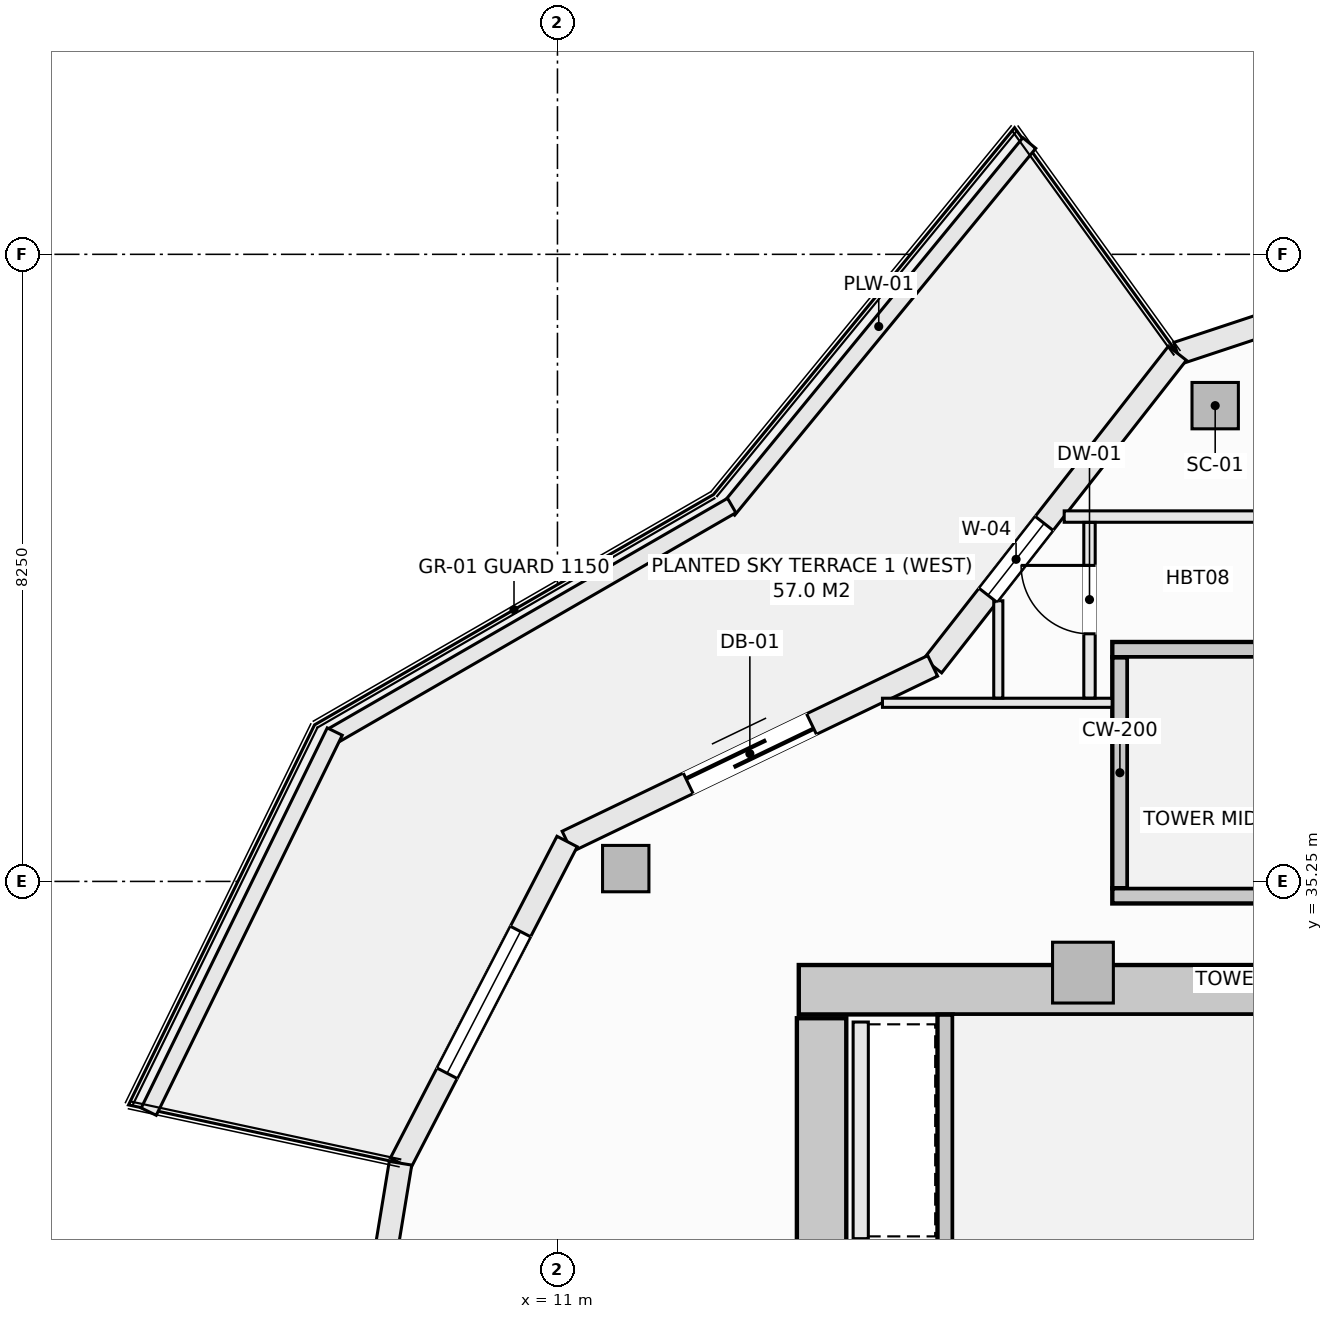
"""IFC4 building model, lengths in metres.
Left out: names, types, materials, properties, quantities, classifications, styles, units other than length and angle.
Written with IfcOpenShell. Run it as: python <this file> out.ifc"""

import sys

from ifc_helpers import new_model, si_unit, direction, frame, frame_2d, origin, origin_2d, place, context, subcontext, project, spatial, rectangle, hollow_rectangle, extrude, element, fill, save


model = new_model("IFC4")
c1 = context("Model", 3, precision=1e-05, world=origin(), true_north=direction((0.0, 1.0)))
c2 = subcontext(c1, "Body", "Model", "MODEL_VIEW")
j1 = project(units=[si_unit("LENGTHUNIT", "METRE"), si_unit("PLANEANGLEUNIT", "RADIAN")], contexts=[c1])
p1 = place(None, origin())
s1 = spatial("IfcSite", under=j1, at=p1, CompositionType="ELEMENT")
p2 = place(p1, origin())
s2 = spatial("IfcBuilding", under=s1, at=p2, CompositionType="ELEMENT")
p3 = place(p2, frame((0.0, 0.0, 183.5)))
s3 = spatial("IfcBuildingStorey", under=s2, at=p3, CompositionType="ELEMENT", Elevation=183.5)
p4 = place(p3, frame((14.175, 33.825, -0.27), z_axis=(0.0, 0.0, 1.0), x_axis=(1.0, 0.0, 0.0)))
e1 = element("IfcWall", 1, at=p4, inside=s3, PredefinedType="SHEAR", context=c2, shape_type="SweptSolid", body=[
    extrude(rectangle(XDim=13.65, YDim=0.65, at=frame_2d((6.825, 0.0))), origin(), (0.0, 0.0, 1.0), 3.35),
])
p5 = place(p3, frame((14.475, 20.55, -0.27), z_axis=(0.0, 0.0, 1.0), x_axis=(0.0, 1.0, 0.0)))
e2 = element("IfcWall", 2, at=p5, inside=s3, PredefinedType="SHEAR", context=c2, shape_type="SweptSolid", body=[
    extrude(rectangle(XDim=12.9, YDim=0.65, at=frame_2d((6.45, 0.0))), origin(), (0.0, 0.0, 1.0), 3.35),
])
for number, where, z_axis, x_axis in (
    (3, (19.654, 41.51, -0.27), (0.0, 0.0, 1.0), (1.0, 0.0, 0.0)),
    (4, (11.898, 35.419, -0.27), (0.0, 0.0, 1.0), (1.0, 0.0, 0.0)),
):
    element("IfcColumn", number, at=place(p3, frame(where, z_axis=z_axis, x_axis=x_axis)), inside=s3, PredefinedType="COLUMN", context=c2, shape_type="SweptSolid", body=[
        extrude(hollow_rectangle(XDim=0.61, YDim=0.61, WallThickness=0.025, at=origin_2d()), origin(), (0.0, 0.0, 1.0), 3.35),
    ])
p6 = place(p3, frame((17.914, 34.05, -0.27), z_axis=(0.0, 0.0, 1.0), x_axis=(1.0, 0.0, 0.0)))
e5 = element("IfcColumn", 5, at=p6, inside=s3, PredefinedType="PILASTER", context=c2, shape_type="SweptSolid", body=[
    extrude(rectangle(XDim=0.8, YDim=0.8, at=origin_2d()), origin(), (0.0, 0.0, 1.0), 3.35),
])
p7 = place(p3, frame((19.156, 42.199, 0.0), z_axis=(0.0, 0.0, 1.0), x_axis=(0.949246811547, 0.314532177636, 0.0)))
e6 = element("IfcWall", 6, at=p7, inside=s3, PredefinedType="SOLIDWALL", context=c2, shape_type="SweptSolid", body=[
    extrude(rectangle(XDim=5.574, YDim=0.3, at=frame_2d((2.787, 0.0))), origin(), (0.0, 0.0, 1.0), 2.603),
])
p8 = place(p7, frame((1.737, 0.0, 0.74)))
e7 = element("IfcOpeningElement", 7, at=p8, cuts=e6, PredefinedType="OPENING", context=c2, shape_type="SweptSolid", body=[
    extrude(rectangle(XDim=2.1, YDim=1.7, at=frame_2d((1.05, 0.85))), frame((0.0, 0.16, 0.0), z_axis=(0.0, -1.0, 0.0), x_axis=(1.0, 0.0, 0.0)), (0.0, 0.0, 1.0), 0.32),
])
p9 = place(p3, frame((15.937, 38.086, 0.0), z_axis=(0.0, 0.0, 1.0), x_axis=(0.616429245738, 0.787410302828, 0.0)))
e8 = element("IfcWall", 8, at=p9, inside=s3, PredefinedType="SOLIDWALL", context=c2, shape_type="SweptSolid", body=[
    extrude(rectangle(XDim=5.223, YDim=0.3, at=frame_2d((2.612, 0.0))), origin(), (0.0, 0.0, 1.0), 2.603),
])
p10 = place(p9, frame((1.18, 0.0, 0.72)))
e9 = element("IfcOpeningElement", 9, at=p10, cuts=e8, PredefinedType="OPENING", context=c2, shape_type="SweptSolid", body=[
    extrude(rectangle(XDim=1.2, YDim=1.65, at=frame_2d((0.6, 0.825))), frame((0.0, 0.16, 0.0), z_axis=(0.0, -1.0, 0.0), x_axis=(1.0, 0.0, 0.0)), (0.0, 0.0, 1.0), 0.32),
])
p11 = place(p3, frame((11.127, 35.775, 0.0), z_axis=(0.0, 0.0, 1.0), x_axis=(0.901353070301, 0.433085029363, 0.0)))
e10 = element("IfcWall", 10, at=p11, inside=s3, PredefinedType="SOLIDWALL", context=c2, shape_type="SweptSolid", body=[
    extrude(rectangle(XDim=5.336, YDim=0.3, at=frame_2d((2.668, 0.0))), origin(), (0.0, 0.0, 1.0), 2.603),
])
p12 = place(p11, frame((1.768, 0.0, 0.0)))
e11 = element("IfcOpeningElement", 11, at=p12, cuts=e10, PredefinedType="OPENING", context=c2, shape_type="SweptSolid", body=[
    extrude(rectangle(XDim=1.8, YDim=2.25, at=frame_2d((0.9, 1.125))), frame((0.0, 0.16, 0.0), z_axis=(0.0, -1.0, 0.0), x_axis=(1.0, 0.0, 0.0)), (0.0, 0.0, 1.0), 0.32),
])
p13 = place(p3, frame((8.935, 31.542, 0.0), z_axis=(0.0, 0.0, 1.0), x_axis=(0.459810251451, 0.888017191647, 0.0)))
e12 = element("IfcWall", 12, at=p13, inside=s3, PredefinedType="SOLIDWALL", context=c2, shape_type="SweptSolid", body=[
    extrude(rectangle(XDim=4.766, YDim=0.3, at=frame_2d((2.383, 0.0))), origin(), (0.0, 0.0, 1.0), 2.603),
])
p14 = place(p13, frame((1.333, 0.0, 0.74)))
e13 = element("IfcOpeningElement", 13, at=p14, cuts=e12, PredefinedType="OPENING", context=c2, shape_type="SweptSolid", body=[
    extrude(rectangle(XDim=2.1, YDim=1.7, at=frame_2d((1.05, 0.85))), frame((0.0, 0.16, 0.0), z_axis=(0.0, -1.0, 0.0), x_axis=(1.0, 0.0, 0.0)), (0.0, 0.0, 1.0), 0.32),
])
p15 = place(p3, frame((8.188, 27.0, 0.0), z_axis=(0.0, 0.0, 1.0), x_axis=(0.162394765401, 0.986725868806, 0.0)))
e14 = element("IfcWall", 14, at=p15, inside=s3, PredefinedType="SOLIDWALL", context=c2, shape_type="SweptSolid", body=[
    extrude(rectangle(XDim=4.603, YDim=0.3, at=frame_2d((2.302, 0.0))), origin(), (0.0, 0.0, 1.0), 2.603),
])
p16 = place(p15, frame((1.252, 0.0, 0.74)))
e15 = element("IfcOpeningElement", 15, at=p16, cuts=e14, PredefinedType="OPENING", context=c2, shape_type="SweptSolid", body=[
    extrude(rectangle(XDim=2.1, YDim=1.7, at=frame_2d((1.05, 0.85))), frame((0.0, 0.16, 0.0), z_axis=(0.0, -1.0, 0.0), x_axis=(1.0, 0.0, 0.0)), (0.0, 0.0, 1.0), 0.32),
])
p17 = place(p3, frame((13.246, 40.137, 0.0), z_axis=(0.0, 0.0, 1.0), x_axis=(0.634429234628, 0.77298094818, 0.0)))
e16 = element("IfcWall", 16, at=p17, inside=s3, PredefinedType="PARAPET", context=c2, shape_type="SweptSolid", body=[
    extrude(rectangle(XDim=6.245, YDim=0.22, at=frame_2d((3.123, 0.0))), origin(), (0.0, 0.0, 1.0), 0.52),
])
p18 = place(p3, frame((8.044, 37.166, 0.0), z_axis=(0.0, 0.0, 1.0), x_axis=(0.866058128659, 0.499943314571, 0.0)))
e17 = element("IfcWall", 17, at=p18, inside=s3, PredefinedType="PARAPET", context=c2, shape_type="SweptSolid", body=[
    extrude(rectangle(XDim=6.06, YDim=0.22, at=frame_2d((3.03, 0.0))), origin(), (0.0, 0.0, 1.0), 0.52),
])
p19 = place(p3, frame((5.622, 32.221, 0.0), z_axis=(0.0, 0.0, 1.0), x_axis=(0.439637174641, 0.898175458735, 0.0)))
e18 = element("IfcWall", 18, at=p19, inside=s3, PredefinedType="PARAPET", context=c2, shape_type="SweptSolid", body=[
    extrude(rectangle(XDim=5.567, YDim=0.22, at=frame_2d((2.784, 0.0))), origin(), (0.0, 0.0, 1.0), 0.52),
])
p20 = place(p3, frame((16.1, 30.462, -0.27), z_axis=(0.0, 0.0, 1.0), x_axis=(0.0, 1.0, 0.0)))
e19 = element("IfcWall", 19, at=p20, inside=s3, PredefinedType="SHEAR", context=c2, shape_type="SweptSolid", body=[
    extrude(rectangle(XDim=3.036, YDim=0.2, at=frame_2d((1.518, 0.0))), origin(), (0.0, 0.0, 1.0), 3.35),
])
p21 = place(p3, frame((18.4, 35.16, -0.27), z_axis=(0.0, 0.0, 1.0), x_axis=(0.0, 1.0, 0.0)))
e20 = element("IfcWall", 20, at=p21, inside=s3, PredefinedType="SHEAR", context=c2, shape_type="SweptSolid", body=[
    extrude(rectangle(XDim=3.04, YDim=0.2, at=frame_2d((1.52, 0.0))), origin(), (0.0, 0.0, 1.0), 3.35),
])
for number, where, z_axis, x_axis in (
    (21, (18.3, 38.3, -0.27), (0.0, 0.0, 1.0), (1.0, 0.0, 0.0)),
    (22, (18.3, 35.06, -0.27), (0.0, 0.0, 1.0), (1.0, 0.0, 0.0)),
):
    element("IfcWall", number, at=place(p3, frame(where, z_axis=z_axis, x_axis=x_axis)), inside=s3, PredefinedType="SHEAR", context=c2, shape_type="SweptSolid", body=[
        extrude(rectangle(XDim=8.95, YDim=0.2, at=frame_2d((4.475, 0.0))), origin(), (0.0, 0.0, 1.0), 3.35),
    ])
p22 = place(p3, frame((14.99, 30.55, 0.0), z_axis=(0.0, 0.0, 1.0), x_axis=(0.0, 1.0, 0.0)))
e23 = element("IfcWall", 23, at=p22, inside=s3, PredefinedType="SOLIDWALL", context=c2, shape_type="SweptSolid", body=[
    extrude(rectangle(XDim=2.85, YDim=0.2, at=frame_2d((1.425, 0.0))), origin(), (0.0, 0.0, 1.0), 3.08),
])
p23 = place(p3, frame((15.276, 37.6, 0.0), z_axis=(0.0, 0.0, 1.0), x_axis=(1.0, 0.0, 0.0)))
e24 = element("IfcWall", 24, at=p23, inside=s3, PredefinedType="PARTITIONING", context=c2, shape_type="SweptSolid", body=[
    extrude(rectangle(XDim=3.022, YDim=0.12, at=frame_2d((1.511, 0.0))), origin(), (0.0, 0.0, 1.0), 3.08),
])
p24 = place(p3, frame((17.667, 40.05, 0.0), z_axis=(0.0, 0.0, 1.0), x_axis=(1.0, 0.0, 0.0)))
e25 = element("IfcWall", 25, at=p24, inside=s3, PredefinedType="PARTITIONING", context=c2, shape_type="SweptSolid", body=[
    extrude(rectangle(XDim=3.183, YDim=0.15, at=frame_2d((1.592, 0.0))), origin(), (0.0, 0.0, 1.0), 2.603),
])
p25 = place(p3, frame((18.0, 37.662, 0.0), z_axis=(0.0, 0.0, 1.0), x_axis=(0.0, 1.0, 0.0)))
e26 = element("IfcWall", 26, at=p25, inside=s3, PredefinedType="PARTITIONING", context=c2, shape_type="SweptSolid", body=[
    extrude(rectangle(XDim=2.311, YDim=0.15, at=frame_2d((1.155, 0.0))), origin(), (0.0, 0.0, 1.0), 3.08),
])
p26 = place(p25, frame((0.845, 0.0, 0.0)))
e27 = element("IfcOpeningElement", 27, at=p26, cuts=e26, PredefinedType="OPENING", context=c2, shape_type="SweptSolid", body=[
    extrude(rectangle(XDim=0.9, YDim=2.1, at=frame_2d((0.45, 1.05))), frame((0.0, 0.085, 0.0), z_axis=(0.0, -1.0, 0.0), x_axis=(1.0, 0.0, 0.0)), (0.0, 0.0, 1.0), 0.17),
])
p27 = place(p3, frame((16.8, 37.662, 0.0), z_axis=(0.0, 0.0, 1.0), x_axis=(0.0, 1.0, 0.0)))
e28 = element("IfcWall", 28, at=p27, inside=s3, PredefinedType="PARTITIONING", context=c2, shape_type="SweptSolid", body=[
    extrude(rectangle(XDim=1.28, YDim=0.12, at=frame_2d((0.64, 0.0))), origin(), (0.0, 0.0, 1.0), 3.08),
])
p28 = place(p10, origin())
e29 = element("IfcWindow", 29, at=p28, inside=s3, PartitioningType="SINGLE_PANEL", PredefinedType="WINDOW", context=c2, shape_type="SweptSolid", body=[
    extrude(rectangle(XDim=1.2, YDim=1.65, at=frame_2d((0.6, 0.825))), frame((0.0, 0.03, 0.0), z_axis=(0.0, -1.0, 0.0), x_axis=(1.0, 0.0, 0.0)), (0.0, 0.0, 1.0), 0.06),
])
fill(e9, e29)
p29 = place(p12, origin())
e30 = element("IfcDoor", 30, at=p29, inside=s3, OperationType="SLIDING_TO_LEFT", PredefinedType="DOOR", context=c2, shape_type="SweptSolid", body=[
    extrude(rectangle(XDim=1.8, YDim=2.25, at=frame_2d((0.9, 1.125))), frame((0.0, 0.025, 0.0), z_axis=(0.0, -1.0, 0.0), x_axis=(1.0, 0.0, 0.0)), (0.0, 0.0, 1.0), 0.05),
])
fill(e11, e30)
p30 = place(p14, origin())
e31 = element("IfcWindow", 31, at=p30, inside=s3, PartitioningType="SINGLE_PANEL", PredefinedType="WINDOW", context=c2, shape_type="SweptSolid", body=[
    extrude(rectangle(XDim=2.1, YDim=1.7, at=frame_2d((1.05, 0.85))), frame((0.0, 0.03, 0.0), z_axis=(0.0, -1.0, 0.0), x_axis=(1.0, 0.0, 0.0)), (0.0, 0.0, 1.0), 0.06),
])
fill(e13, e31)
p31 = place(p26, origin())
e32 = element("IfcDoor", 32, at=p31, inside=s3, OperationType="SINGLE_SWING_RIGHT", PredefinedType="DOOR", context=c2, shape_type="SweptSolid", body=[
    extrude(rectangle(XDim=0.9, YDim=2.1, at=frame_2d((0.45, 1.05))), frame((0.0, 0.025, 0.0), z_axis=(0.0, -1.0, 0.0), x_axis=(1.0, 0.0, 0.0)), (0.0, 0.0, 1.0), 0.05),
])
fill(e27, e32)
save(model, sys.argv[1])
